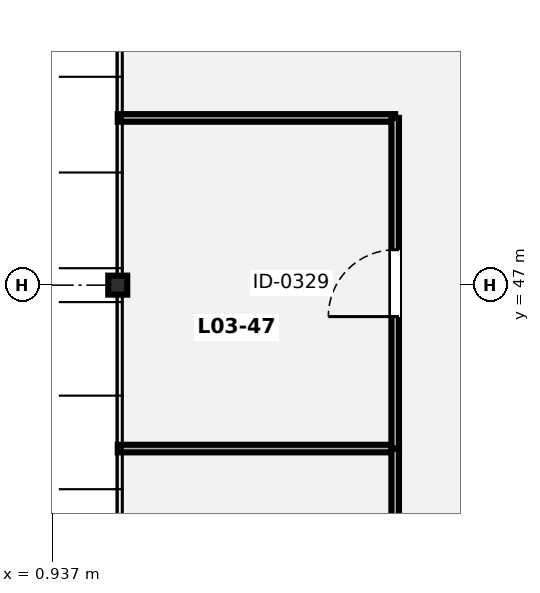
"""IFC4 building model, lengths in metres.
Left out: names, types, materials, properties, quantities, classifications, styles, units other than length and angle.
Written with IfcOpenShell. Run it as: python <this file> out.ifc"""

import sys

from ifc_helpers import new_model, si_unit, direction, frame, frame_2d, origin, origin_2d, place, context, subcontext, project, spatial, rectangle, hollow_rectangle, extrude, element, fill, save


model = new_model("IFC4")
c1 = context("Model", 3, precision=1e-05, world=origin(), true_north=direction((0.0, 1.0)))
c2 = subcontext(c1, "Body", "Model", "MODEL_VIEW")
j1 = project(units=[si_unit("LENGTHUNIT", "METRE"), si_unit("PLANEANGLEUNIT", "RADIAN")], contexts=[c1])
p1 = place(None, origin())
s1 = spatial("IfcSite", under=j1, at=p1, CompositionType="ELEMENT")
p2 = place(p1, origin())
s2 = spatial("IfcBuilding", under=s1, at=p2, CompositionType="ELEMENT")
p3 = place(p2, frame((0.0, 0.0, 13.3)))
s3 = spatial("IfcBuildingStorey", under=s2, at=p3, CompositionType="ELEMENT", Elevation=13.3)
p4 = place(p3, frame((1.8, 47.0, 0.0), z_axis=(0.0, 0.0, 1.0), x_axis=(1.0, 0.0, 0.0)))
e1 = element("IfcColumn", 1, at=p4, inside=s3, PredefinedType="COLUMN", context=c2, shape_type="SweptSolid", body=[
    extrude(hollow_rectangle(XDim=0.25, YDim=0.25, WallThickness=0.012, at=origin_2d()), origin(), (0.0, 0.0, 1.0), 4.2),
])
p5 = place(p3, frame((1.8, 44.85, 0.0), z_axis=(0.0, 0.0, 1.0), x_axis=(1.0, 0.0, 0.0)))
e2 = element("IfcWall", 2, at=p5, inside=s3, PredefinedType="PARTITIONING", context=c2, shape_type="SweptSolid", body=[
    extrude(rectangle(XDim=3.65, YDim=0.1, at=frame_2d((1.825, 0.0))), origin(), (0.0, 0.0, 1.0), 4.0),
])
p6 = place(p3, frame((5.45, 41.6, 0.0), z_axis=(0.0, 0.0, 1.0), x_axis=(0.0, 1.0, 0.0)))
e3 = element("IfcWall", 3, at=p6, inside=s3, PredefinedType="PARTITIONING", context=c2, shape_type="SweptSolid", body=[
    extrude(rectangle(XDim=3.25, YDim=0.1, at=frame_2d((1.625, 0.0))), origin(), (0.0, 0.0, 1.0), 4.0),
])
p7 = place(p6, frame((1.125, 0.0, 0.0)))
e4 = element("IfcOpeningElement", 4, at=p7, cuts=e3, PredefinedType="OPENING", context=c2, shape_type="SweptSolid", body=[
    extrude(rectangle(XDim=1.0, YDim=2.1, at=frame_2d((0.5, 1.05))), frame((0.0, 0.06, 0.0), z_axis=(0.0, -1.0, 0.0), x_axis=(1.0, 0.0, 0.0)), (0.0, 0.0, 1.0), 0.12),
])
p8 = place(p3, frame((1.8, 49.2, 0.0), z_axis=(0.0, 0.0, 1.0), x_axis=(1.0, 0.0, 0.0)))
e5 = element("IfcWall", 5, at=p8, inside=s3, PredefinedType="PARTITIONING", context=c2, shape_type="SweptSolid", body=[
    extrude(rectangle(XDim=3.65, YDim=0.1, at=frame_2d((1.825, 0.0))), origin(), (0.0, 0.0, 1.0), 4.0),
])
p9 = place(p3, frame((5.45, 44.852, 0.0), z_axis=(0.0, 0.0, 1.0), x_axis=(0.0, 1.0, 0.0)))
e6 = element("IfcWall", 6, at=p9, inside=s3, PredefinedType="PARTITIONING", context=c2, shape_type="SweptSolid", body=[
    extrude(rectangle(XDim=4.348, YDim=0.1, at=frame_2d((2.174, 0.0))), origin(), (0.0, 0.0, 1.0), 4.0),
])
p10 = place(p9, frame((1.734, 0.0, 0.0)))
e7 = element("IfcOpeningElement", 7, at=p10, cuts=e6, PredefinedType="OPENING", context=c2, shape_type="SweptSolid", body=[
    extrude(rectangle(XDim=0.88, YDim=2.08, at=frame_2d((0.44, 1.04))), frame((0.0, 0.06, 0.0), z_axis=(0.0, -1.0, 0.0), x_axis=(1.0, 0.0, 0.0)), (0.0, 0.0, 1.0), 0.12),
])
p11 = place(p10, origin())
e8 = element("IfcDoor", 8, at=p11, inside=s3, OperationType="SINGLE_SWING_LEFT", PredefinedType="DOOR", context=c2, shape_type="SweptSolid", body=[
    extrude(rectangle(XDim=0.88, YDim=2.08, at=frame_2d((0.44, 1.04))), frame((0.0, 0.025, 0.0), z_axis=(0.0, -1.0, 0.0), x_axis=(1.0, 0.0, 0.0)), (0.0, 0.0, 1.0), 0.05),
])
fill(e7, e8)
save(model, sys.argv[1])
